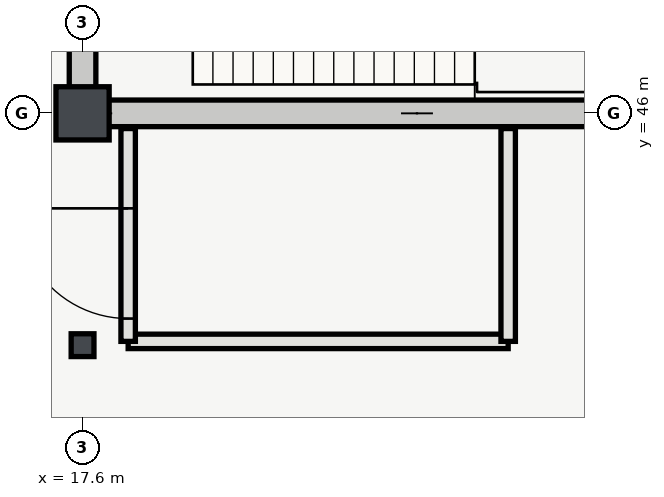
"""IFC4 building model, lengths in metres.
Left out: names, types, materials, properties, quantities, classifications, styles, units other than length and angle.
Written with IfcOpenShell. Run it as: python <this file> out.ifc"""

import sys

from ifc_helpers import new_model, si_unit, direction, frame, frame_2d, origin, origin_2d, place, context, subcontext, project, spatial, rectangle, i_section, extrude, element, fill, save


model = new_model("IFC4")
c1 = context("Model", 3, precision=1e-05, world=origin(), true_north=direction((0.0, 1.0)))
c2 = subcontext(c1, "Body", "Model", "MODEL_VIEW")
j1 = project(units=[si_unit("LENGTHUNIT", "METRE"), si_unit("PLANEANGLEUNIT", "RADIAN")], contexts=[c1])
p1 = place(None, origin())
s1 = spatial("IfcSite", under=j1, at=p1, CompositionType="ELEMENT")
p2 = place(p1, origin())
s2 = spatial("IfcBuilding", under=s1, at=p2, CompositionType="ELEMENT")
p3 = place(p2, frame((0.0, 0.0, -4.8)))
s3 = spatial("IfcBuildingStorey", under=s2, at=p3, CompositionType="ELEMENT", Elevation=-4.8)
p4 = place(p3, frame((17.6, 46.0, 0.0), z_axis=(0.0, 0.0, 1.0), x_axis=(1.0, 0.0, 0.0)))
e1 = element("IfcColumn", 1, at=p4, inside=s3, PredefinedType="COLUMN", context=c2, shape_type="SweptSolid", body=[
    extrude(rectangle(XDim=0.7, YDim=0.7, at=origin_2d()), origin(), (0.0, 0.0, 1.0), 4.8),
])
p5 = place(p3, frame((17.425, 46.0, 0.0), z_axis=(0.0, 0.0, 1.0), x_axis=(1.0, 0.0, 0.0)))
e2 = element("IfcWall", 2, at=p5, inside=s3, PredefinedType="SHEAR", context=c2, shape_type="SweptSolid", body=[
    extrude(rectangle(XDim=9.15, YDim=0.35, at=frame_2d((4.575, 0.0))), origin(), (0.0, 0.0, 1.0), 4.52),
])
p6 = place(p3, frame((17.6, 46.175, 0.0), z_axis=(0.0, 0.0, 1.0), x_axis=(0.0, 1.0, 0.0)))
e3 = element("IfcWall", 3, at=p6, inside=s3, PredefinedType="SHEAR", context=c2, shape_type="SweptSolid", body=[
    extrude(rectangle(XDim=7.65, YDim=0.35, at=frame_2d((3.825, 0.0))), origin(), (0.0, 0.0, 1.0), 4.52),
])
p7 = place(p6, frame((1.625, 0.0, 0.0)))
e4 = element("IfcOpeningElement", 4, at=p7, cuts=e3, PredefinedType="OPENING", context=c2, shape_type="SweptSolid", body=[
    extrude(rectangle(XDim=1.4, YDim=2.2, at=frame_2d((0.7, 1.1))), frame((0.0, 0.185, 0.0), z_axis=(0.0, -1.0, 0.0), x_axis=(1.0, 0.0, 0.0)), (0.0, 0.0, 1.0), 0.37),
])
p8 = place(p3, frame((18.2, 43.0, 0.0), z_axis=(0.0, 0.0, 1.0), x_axis=(1.0, 0.0, 0.0)))
e5 = element("IfcWall", 5, at=p8, inside=s3, PredefinedType="PARTITIONING", context=c2, shape_type="SweptSolid", body=[
    extrude(rectangle(XDim=5.0, YDim=0.19, at=frame_2d((2.5, 0.0))), origin(), (0.0, 0.0, 1.0), 4.52),
])
p9 = place(p3, frame((18.2, 45.8, 0.0), z_axis=(0.0, 0.0, 1.0), x_axis=(0.0, -1.0, 0.0)))
e6 = element("IfcWall", 6, at=p9, inside=s3, PredefinedType="PARTITIONING", context=c2, shape_type="SweptSolid", body=[
    extrude(rectangle(XDim=2.8, YDim=0.19, at=frame_2d((1.4, 0.0))), origin(), (0.0, 0.0, 1.0), 4.52),
])
p10 = place(p9, frame((1.05, 0.0, 0.0)))
e7 = element("IfcOpeningElement", 7, at=p10, cuts=e6, PredefinedType="OPENING", context=c2, shape_type="SweptSolid", body=[
    extrude(rectangle(XDim=1.45, YDim=2.2, at=frame_2d((0.725, 1.1))), frame((0.0, 0.105, 0.0), z_axis=(0.0, -1.0, 0.0), x_axis=(1.0, 0.0, 0.0)), (0.0, 0.0, 1.0), 0.21),
])
p11 = place(p3, frame((23.2, 43.0, 0.0), z_axis=(0.0, 0.0, 1.0), x_axis=(0.0, 1.0, 0.0)))
e8 = element("IfcWall", 8, at=p11, inside=s3, PredefinedType="PARTITIONING", context=c2, shape_type="SweptSolid", body=[
    extrude(rectangle(XDim=2.8, YDim=0.19, at=frame_2d((1.4, 0.0))), origin(), (0.0, 0.0, 1.0), 4.52),
])
p12 = place(p3, frame((17.6, 42.95, 0.0), z_axis=(0.0, 0.0, 1.0), x_axis=(1.0, 0.0, 0.0)))
e9 = element("IfcColumn", 9, at=p12, inside=s3, PredefinedType="COLUMN", context=c2, shape_type="SweptSolid", body=[
    extrude(i_section(OverallWidth=0.3, OverallDepth=0.3, WebThickness=0.01, FlangeThickness=0.015, FilletRadius=0.018, at=origin_2d()), origin(), (0.0, 0.0, 1.0), 4.8),
])
p13 = place(p10, origin())
e10 = element("IfcDoor", 10, at=p13, inside=s3, OperationType="SINGLE_SWING_LEFT", PredefinedType="DOOR", context=c2, shape_type="SweptSolid", body=[
    extrude(rectangle(XDim=1.45, YDim=2.2, at=frame_2d((0.725, 1.1))), frame((0.0, 0.025, 0.0), z_axis=(0.0, -1.0, 0.0), x_axis=(1.0, 0.0, 0.0)), (0.0, 0.0, 1.0), 0.05),
])
fill(e7, e10)
save(model, sys.argv[1])
